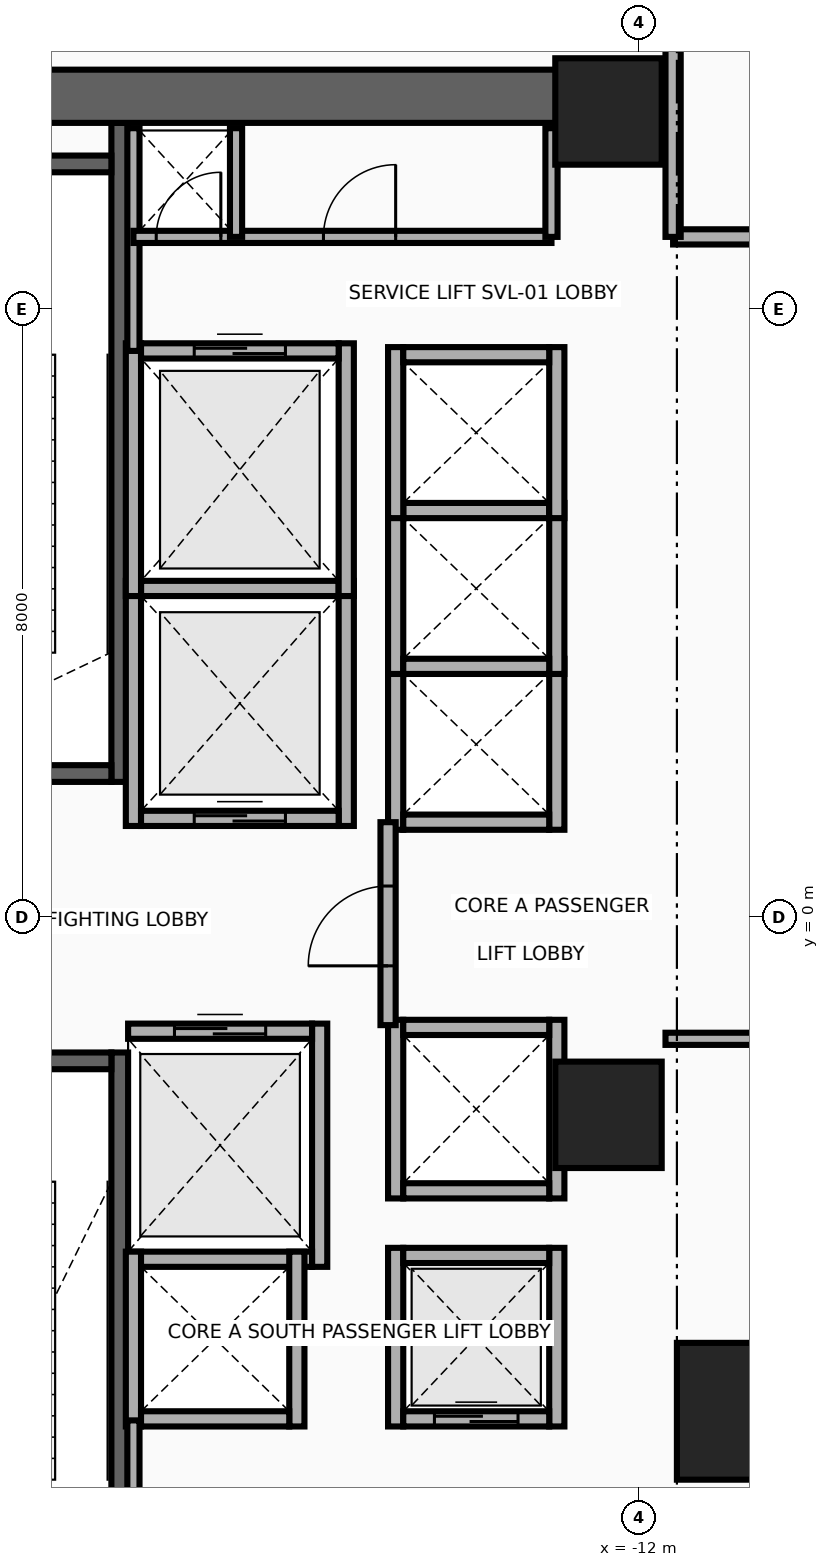
"""IFC4 building model, lengths in metres.
Left out: names, types, materials, properties, quantities, classifications, styles, units other than length and angle.
Written with IfcOpenShell. Run it as: python <this file> out.ifc"""

import sys

from ifc_helpers import new_model, si_unit, direction, frame, frame_2d, origin, origin_2d, place, context, subcontext, project, spatial, rectangle, extrude, source, transform, mapped, element, fill, save


model = new_model("IFC4")
c1 = context("Model", 3, precision=1e-05, world=origin(), true_north=direction((0.0, 1.0)))
c2 = subcontext(c1, "Body", "Model", "MODEL_VIEW")
j1 = project(units=[si_unit("LENGTHUNIT", "METRE"), si_unit("PLANEANGLEUNIT", "RADIAN")], contexts=[c1])
p1 = place(None, origin())
s1 = spatial("IfcSite", under=j1, at=p1, CompositionType="ELEMENT")
p2 = place(p1, origin())
s2 = spatial("IfcBuilding", under=s1, at=p2, CompositionType="ELEMENT")
p3 = place(p2, frame((0.0, 0.0, 20.8)))
s3 = spatial("IfcBuildingStorey", under=s2, at=p3, CompositionType="ELEMENT", Elevation=20.8)
p4 = place(p3, frame((-18.83, 1.78, 0.0), z_axis=(0.0, 0.0, 1.0), x_axis=(0.0, 1.0, 0.0)))
e1 = element("IfcWall", 1, at=p4, inside=s3, PredefinedType="SHEAR", context=c2, shape_type="SweptSolid", body=[
    extrude(rectangle(XDim=8.67, YDim=0.22, at=frame_2d((4.335, 0.0))), origin(), (0.0, 0.0, 1.0), 4.96),
])
p5 = place(p3, frame((-22.05, 1.89, 0.0), z_axis=(0.0, 0.0, 1.0), x_axis=(1.0, 0.0, 0.0)))
e2 = element("IfcWall", 2, at=p5, inside=s3, PredefinedType="SHEAR", context=c2, shape_type="SweptSolid", body=[
    extrude(rectangle(XDim=3.11, YDim=0.22, at=frame_2d((1.555, 0.0))), origin(), (0.0, 0.0, 1.0), 4.96),
])
p6 = place(p5, frame((1.0, 0.0, 0.0)))
e3 = element("IfcOpeningElement", 3, at=p6, cuts=e2, PredefinedType="OPENING", context=c2, shape_type="SweptSolid", body=[
    extrude(rectangle(XDim=1.1, YDim=2.15, at=frame_2d((0.55, 1.075))), frame((0.0, 0.125, 0.0), z_axis=(0.0, -1.0, 0.0), x_axis=(1.0, 0.0, 0.0)), (0.0, 0.0, 1.0), 0.25),
])
p7 = place(p3, frame((-22.05, 9.91, 0.0), z_axis=(0.0, 0.0, 1.0), x_axis=(1.0, 0.0, 0.0)))
e4 = element("IfcWall", 4, at=p7, inside=s3, PredefinedType="SHEAR", context=c2, shape_type="SweptSolid", body=[
    extrude(rectangle(XDim=3.11, YDim=0.22, at=frame_2d((1.555, 0.0))), origin(), (0.0, 0.0, 1.0), 4.96),
])
p8 = place(p3, frame((-18.83, -10.45, 0.0), z_axis=(0.0, 0.0, 1.0), x_axis=(0.0, 1.0, 0.0)))
e5 = element("IfcWall", 5, at=p8, inside=s3, PredefinedType="SHEAR", context=c2, shape_type="SweptSolid", body=[
    extrude(rectangle(XDim=8.67, YDim=0.22, at=frame_2d((4.335, 0.0))), origin(), (0.0, 0.0, 1.0), 4.96),
])
p9 = place(p3, frame((-22.05, -1.89, 0.0), z_axis=(0.0, 0.0, 1.0), x_axis=(1.0, 0.0, 0.0)))
e6 = element("IfcWall", 6, at=p9, inside=s3, PredefinedType="SHEAR", context=c2, shape_type="SweptSolid", body=[
    extrude(rectangle(XDim=3.11, YDim=0.22, at=frame_2d((1.555, 0.0))), origin(), (0.0, 0.0, 1.0), 4.96),
])
p10 = place(p9, frame((1.0, 0.0, 0.0)))
e7 = element("IfcOpeningElement", 7, at=p10, cuts=e6, PredefinedType="OPENING", context=c2, shape_type="SweptSolid", body=[
    extrude(rectangle(XDim=1.1, YDim=2.15, at=frame_2d((0.55, 1.075))), frame((0.0, 0.125, 0.0), z_axis=(0.0, -1.0, 0.0), x_axis=(1.0, 0.0, 0.0)), (0.0, 0.0, 1.0), 0.25),
])
p11 = place(p3, frame((-22.65, 10.8, 0.0), z_axis=(0.0, 0.0, 1.0), x_axis=(1.0, 0.0, 0.0)))
e8 = element("IfcWall", 8, at=p11, inside=s3, PredefinedType="SHEAR", context=c2, shape_type="SweptSolid", body=[
    extrude(rectangle(XDim=10.25, YDim=0.7, at=frame_2d((5.125, 0.0))), origin(), (0.0, 0.0, 1.0), 4.96),
])
m1 = source(origin(), c2, "Body", "SweptSolid", [
    extrude(rectangle(XDim=1.4, YDim=1.4, at=origin_2d()), origin(), (0.0, 0.0, 1.0), 5.2),
])
for number, where, z_axis, x_axis in (
    (9, (-12.4, -2.6, 0.0), (0.0, 0.0, 1.0), (1.0, 0.0, 0.0)),
    (10, (-12.4, 10.6, 0.0), (0.0, 0.0, 1.0), (1.0, 0.0, 0.0)),
):
    element("IfcColumn", number, at=place(p3, frame(where, z_axis=z_axis, x_axis=x_axis)), inside=s3, PredefinedType="COLUMN", context=c2, shape_type="MappedRepresentation", body=[
        mapped(m1, transform((0.0, 0.0, 0.0), x_axis=(1.0, 0.0, 0.0), y_axis=(0.0, 1.0, 0.0), z_axis=(0.0, 0.0, 1.0), scale=1.0)),
    ])
m2 = source(origin(), c2, "Body", "SweptSolid", [
    extrude(rectangle(XDim=1.8, YDim=1.8, at=origin_2d()), origin(), (0.0, 0.0, 1.0), 5.2),
])
p12 = place(p3, frame((-10.6, -6.5, 0.0), z_axis=(0.0, 0.0, 1.0), x_axis=(1.0, 0.0, 0.0)))
e11 = element("IfcColumn", 11, at=p12, inside=s3, PredefinedType="COLUMN", context=c2, shape_type="MappedRepresentation", body=[
    mapped(m2, transform((0.0, 0.0, 0.0), x_axis=(1.0, 0.0, 0.0), y_axis=(0.0, 1.0, 0.0), z_axis=(0.0, 0.0, 1.0), scale=1.0)),
])
for number, where, z_axis, x_axis in (
    (12, (-18.65, 1.2, 0.0), (0.0, 0.0, 1.0), (0.0, 1.0, 0.0)),
    (13, (-15.85, 1.2, 0.0), (0.0, 0.0, 1.0), (0.0, 1.0, 0.0)),
):
    element("IfcWall", number, at=place(p3, frame(where, z_axis=z_axis, x_axis=x_axis)), inside=s3, PredefinedType="MOVABLE", context=c2, shape_type="SweptSolid", body=[
        extrude(rectangle(XDim=3.225, YDim=0.2, at=frame_2d((1.613, 0.0))), origin(), (0.0, 0.0, 1.0), 4.96),
    ])
p13 = place(p3, frame((-18.55, 1.3, 0.0), z_axis=(0.0, 0.0, 1.0), x_axis=(1.0, 0.0, 0.0)))
e14 = element("IfcWall", 14, at=p13, inside=s3, PredefinedType="MOVABLE", context=c2, shape_type="SweptSolid", body=[
    extrude(rectangle(XDim=2.6, YDim=0.2, at=frame_2d((1.3, 0.0))), origin(), (0.0, 0.0, 1.0), 4.96),
])
p14 = place(p13, frame((0.7, 0.0, 0.0)))
e15 = element("IfcOpeningElement", 15, at=p14, cuts=e14, PredefinedType="OPENING", context=c2, shape_type="SweptSolid", body=[
    extrude(rectangle(XDim=1.2, YDim=2.1, at=frame_2d((0.6, 1.05))), frame((0.0, 0.115, 0.0), z_axis=(0.0, -1.0, 0.0), x_axis=(1.0, 0.0, 0.0)), (0.0, 0.0, 1.0), 0.23),
])
p15 = place(p3, frame((-18.55, 4.325, 0.0), z_axis=(0.0, 0.0, 1.0), x_axis=(1.0, 0.0, 0.0)))
e16 = element("IfcWall", 16, at=p15, inside=s3, PredefinedType="MOVABLE", context=c2, shape_type="SweptSolid", body=[
    extrude(rectangle(XDim=2.6, YDim=0.2, at=frame_2d((1.3, 0.0))), origin(), (0.0, 0.0, 1.0), 4.96),
])
p16 = place(p3, frame((-16.2, -4.6, 0.0), z_axis=(0.0, 0.0, 1.0), x_axis=(0.0, 1.0, 0.0)))
e17 = element("IfcWall", 17, at=p16, inside=s3, PredefinedType="MOVABLE", context=c2, shape_type="SweptSolid", body=[
    extrude(rectangle(XDim=3.2, YDim=0.2, at=frame_2d((1.6, 0.0))), origin(), (0.0, 0.0, 1.0), 4.96),
])
p17 = place(p3, frame((-18.72, -4.5, 0.0), z_axis=(0.0, 0.0, 1.0), x_axis=(1.0, 0.0, 0.0)))
e18 = element("IfcWall", 18, at=p17, inside=s3, PredefinedType="MOVABLE", context=c2, shape_type="SweptSolid", body=[
    extrude(rectangle(XDim=2.42, YDim=0.2, at=frame_2d((1.21, 0.0))), origin(), (0.0, 0.0, 1.0), 4.96),
])
p18 = place(p3, frame((-18.72, -1.5, 0.0), z_axis=(0.0, 0.0, 1.0), x_axis=(1.0, 0.0, 0.0)))
e19 = element("IfcWall", 19, at=p18, inside=s3, PredefinedType="MOVABLE", context=c2, shape_type="SweptSolid", body=[
    extrude(rectangle(XDim=2.42, YDim=0.2, at=frame_2d((1.21, 0.0))), origin(), (0.0, 0.0, 1.0), 4.96),
])
p19 = place(p18, frame((0.61, 0.0, 0.0)))
e20 = element("IfcOpeningElement", 20, at=p19, cuts=e19, PredefinedType="OPENING", context=c2, shape_type="SweptSolid", body=[
    extrude(rectangle(XDim=1.2, YDim=2.1, at=frame_2d((0.6, 1.05))), frame((0.0, 0.115, 0.0), z_axis=(0.0, -1.0, 0.0), x_axis=(1.0, 0.0, 0.0)), (0.0, 0.0, 1.0), 0.23),
])
for number, where, z_axis, x_axis in (
    (21, (-18.65, 4.225, 0.0), (0.0, 0.0, 1.0), (0.0, 1.0, 0.0)),
    (22, (-15.85, 4.225, 0.0), (0.0, 0.0, 1.0), (0.0, 1.0, 0.0)),
):
    element("IfcWall", number, at=place(p3, frame(where, z_axis=z_axis, x_axis=x_axis)), inside=s3, PredefinedType="MOVABLE", context=c2, shape_type="SweptSolid", body=[
        extrude(rectangle(XDim=3.325, YDim=0.2, at=frame_2d((1.663, 0.0))), origin(), (0.0, 0.0, 1.0), 4.96),
    ])
p20 = place(p3, frame((-18.55, 7.45, 0.0), z_axis=(0.0, 0.0, 1.0), x_axis=(1.0, 0.0, 0.0)))
e23 = element("IfcWall", 23, at=p20, inside=s3, PredefinedType="MOVABLE", context=c2, shape_type="SweptSolid", body=[
    extrude(rectangle(XDim=2.6, YDim=0.2, at=frame_2d((1.3, 0.0))), origin(), (0.0, 0.0, 1.0), 4.96),
])
p21 = place(p20, frame((0.7, 0.0, 0.0)))
e24 = element("IfcOpeningElement", 24, at=p21, cuts=e23, PredefinedType="OPENING", context=c2, shape_type="SweptSolid", body=[
    extrude(rectangle(XDim=1.2, YDim=2.1, at=frame_2d((0.6, 1.05))), frame((0.0, 0.115, 0.0), z_axis=(0.0, -1.0, 0.0), x_axis=(1.0, 0.0, 0.0)), (0.0, 0.0, 1.0), 0.23),
])
for number, where, z_axis, x_axis in (
    (25, (-15.2, -6.7, 0.0), (0.0, 0.0, 1.0), (0.0, 1.0, 0.0)),
    (26, (-13.08, -6.7, 0.0), (0.0, 0.0, 1.0), (0.0, 1.0, 0.0)),
):
    element("IfcWall", number, at=place(p3, frame(where, z_axis=z_axis, x_axis=x_axis)), inside=s3, PredefinedType="MOVABLE", context=c2, shape_type="SweptSolid", body=[
        extrude(rectangle(XDim=2.35, YDim=0.2, at=frame_2d((1.175, 0.0))), origin(), (0.0, 0.0, 1.0), 4.96),
    ])
p22 = place(p3, frame((-15.1, -6.6, 0.0), z_axis=(0.0, 0.0, 1.0), x_axis=(1.0, 0.0, 0.0)))
e27 = element("IfcWall", 27, at=p22, inside=s3, PredefinedType="MOVABLE", context=c2, shape_type="SweptSolid", body=[
    extrude(rectangle(XDim=1.92, YDim=0.2, at=frame_2d((0.96, 0.0))), origin(), (0.0, 0.0, 1.0), 4.96),
])
p23 = place(p22, frame((0.41, 0.0, 0.0)))
e28 = element("IfcOpeningElement", 28, at=p23, cuts=e27, PredefinedType="OPENING", context=c2, shape_type="SweptSolid", body=[
    extrude(rectangle(XDim=1.1, YDim=2.1, at=frame_2d((0.55, 1.05))), frame((0.0, 0.115, 0.0), z_axis=(0.0, -1.0, 0.0), x_axis=(1.0, 0.0, 0.0)), (0.0, 0.0, 1.0), 0.23),
])
p24 = place(p3, frame((-15.1, -4.45, 0.0), z_axis=(0.0, 0.0, 1.0), x_axis=(1.0, 0.0, 0.0)))
e29 = element("IfcWall", 29, at=p24, inside=s3, PredefinedType="MOVABLE", context=c2, shape_type="SweptSolid", body=[
    extrude(rectangle(XDim=1.92, YDim=0.2, at=frame_2d((0.96, 0.0))), origin(), (0.0, 0.0, 1.0), 4.96),
])
for number, where, z_axis, x_axis in (
    (30, (-15.2, 1.15, 0.0), (0.0, 0.0, 1.0), (0.0, 1.0, 0.0)),
    (31, (-13.08, 1.15, 0.0), (0.0, 0.0, 1.0), (0.0, 1.0, 0.0)),
):
    element("IfcWall", number, at=place(p3, frame(where, z_axis=z_axis, x_axis=x_axis)), inside=s3, PredefinedType="MOVABLE", context=c2, shape_type="SweptSolid", body=[
        extrude(rectangle(XDim=2.25, YDim=0.2, at=frame_2d((1.125, 0.0))), origin(), (0.0, 0.0, 1.0), 4.96),
    ])
p25 = place(p3, frame((-15.1, 1.25, 0.0), z_axis=(0.0, 0.0, 1.0), x_axis=(1.0, 0.0, 0.0)))
e32 = element("IfcWall", 32, at=p25, inside=s3, PredefinedType="MOVABLE", context=c2, shape_type="SweptSolid", body=[
    extrude(rectangle(XDim=1.92, YDim=0.2, at=frame_2d((0.96, 0.0))), origin(), (0.0, 0.0, 1.0), 4.96),
])
for number, where, z_axis, x_axis in (
    (33, (-15.2, 3.2, 0.0), (0.0, 0.0, 1.0), (0.0, 1.0, 0.0)),
    (34, (-13.08, 3.2, 0.0), (0.0, 0.0, 1.0), (0.0, 1.0, 0.0)),
):
    element("IfcWall", number, at=place(p3, frame(where, z_axis=z_axis, x_axis=x_axis)), inside=s3, PredefinedType="MOVABLE", context=c2, shape_type="SweptSolid", body=[
        extrude(rectangle(XDim=2.25, YDim=0.2, at=frame_2d((1.125, 0.0))), origin(), (0.0, 0.0, 1.0), 4.96),
    ])
for number, where, z_axis, x_axis in (
    (35, (-15.1, 3.3, 0.0), (0.0, 0.0, 1.0), (1.0, 0.0, 0.0)),
    (36, (-15.1, 5.35, 0.0), (0.0, 0.0, 1.0), (1.0, 0.0, 0.0)),
):
    element("IfcWall", number, at=place(p3, frame(where, z_axis=z_axis, x_axis=x_axis)), inside=s3, PredefinedType="MOVABLE", context=c2, shape_type="SweptSolid", body=[
        extrude(rectangle(XDim=1.92, YDim=0.2, at=frame_2d((0.96, 0.0))), origin(), (0.0, 0.0, 1.0), 4.96),
    ])
for number, where, z_axis, x_axis in (
    (37, (-15.2, 5.25, 0.0), (0.0, 0.0, 1.0), (0.0, 1.0, 0.0)),
    (38, (-13.08, 5.25, 0.0), (0.0, 0.0, 1.0), (0.0, 1.0, 0.0)),
):
    element("IfcWall", number, at=place(p3, frame(where, z_axis=z_axis, x_axis=x_axis)), inside=s3, PredefinedType="MOVABLE", context=c2, shape_type="SweptSolid", body=[
        extrude(rectangle(XDim=2.25, YDim=0.2, at=frame_2d((1.125, 0.0))), origin(), (0.0, 0.0, 1.0), 4.96),
    ])
p26 = place(p3, frame((-15.1, 7.4, 0.0), z_axis=(0.0, 0.0, 1.0), x_axis=(1.0, 0.0, 0.0)))
e39 = element("IfcWall", 39, at=p26, inside=s3, PredefinedType="MOVABLE", context=c2, shape_type="SweptSolid", body=[
    extrude(rectangle(XDim=1.92, YDim=0.2, at=frame_2d((0.96, 0.0))), origin(), (0.0, 0.0, 1.0), 4.96),
])
for number, where, z_axis, x_axis in (
    (40, (-18.65, -6.7, 0.0), (0.0, 0.0, 1.0), (0.0, 1.0, 0.0)),
    (41, (-16.5, -6.7, 0.0), (0.0, 0.0, 1.0), (0.0, 1.0, 0.0)),
):
    element("IfcWall", number, at=place(p3, frame(where, z_axis=z_axis, x_axis=x_axis)), inside=s3, PredefinedType="MOVABLE", context=c2, shape_type="SweptSolid", body=[
        extrude(rectangle(XDim=2.3, YDim=0.2, at=frame_2d((1.15, 0.0))), origin(), (0.0, 0.0, 1.0), 4.96),
    ])
p27 = place(p3, frame((-18.55, -6.6, 0.0), z_axis=(0.0, 0.0, 1.0), x_axis=(1.0, 0.0, 0.0)))
e42 = element("IfcWall", 42, at=p27, inside=s3, PredefinedType="MOVABLE", context=c2, shape_type="SweptSolid", body=[
    extrude(rectangle(XDim=1.95, YDim=0.2, at=frame_2d((0.975, 0.0))), origin(), (0.0, 0.0, 1.0), 4.96),
])
for number, where, z_axis, x_axis in (
    (43, (-15.2, -3.7, 0.0), (0.0, 0.0, 1.0), (0.0, 1.0, 0.0)),
    (44, (-13.08, -3.7, 0.0), (0.0, 0.0, 1.0), (0.0, 1.0, 0.0)),
):
    element("IfcWall", number, at=place(p3, frame(where, z_axis=z_axis, x_axis=x_axis)), inside=s3, PredefinedType="MOVABLE", context=c2, shape_type="SweptSolid", body=[
        extrude(rectangle(XDim=2.35, YDim=0.2, at=frame_2d((1.175, 0.0))), origin(), (0.0, 0.0, 1.0), 4.96),
    ])
for number, where, z_axis, x_axis in (
    (45, (-15.1, -3.6, 0.0), (0.0, 0.0, 1.0), (1.0, 0.0, 0.0)),
    (46, (-15.1, -1.45, 0.0), (0.0, 0.0, 1.0), (1.0, 0.0, 0.0)),
):
    element("IfcWall", number, at=place(p3, frame(where, z_axis=z_axis, x_axis=x_axis)), inside=s3, PredefinedType="MOVABLE", context=c2, shape_type="SweptSolid", body=[
        extrude(rectangle(XDim=1.92, YDim=0.2, at=frame_2d((0.96, 0.0))), origin(), (0.0, 0.0, 1.0), 4.96),
    ])
p28 = place(p3, frame((-15.3, -1.42, 0.0), z_axis=(0.0, 0.0, 1.0), x_axis=(0.0, 1.0, 0.0)))
e47 = element("IfcWall", 47, at=p28, inside=s3, PredefinedType="PARTITIONING", context=c2, shape_type="SweptSolid", body=[
    extrude(rectangle(XDim=2.67, YDim=0.2, at=frame_2d((1.335, 0.0))), origin(), (0.0, 0.0, 1.0), 4.96),
])
p29 = place(p28, frame((0.78, 0.0, 0.0)))
e48 = element("IfcOpeningElement", 48, at=p29, cuts=e47, PredefinedType="OPENING", context=c2, shape_type="SweptSolid", body=[
    extrude(rectangle(XDim=1.05, YDim=2.15, at=frame_2d((0.525, 1.075))), frame((0.0, 0.115, 0.0), z_axis=(0.0, -1.0, 0.0), x_axis=(1.0, 0.0, 0.0)), (0.0, 0.0, 1.0), 0.23),
])
p30 = place(p3, frame((-18.65, 7.45, 0.0), z_axis=(0.0, 0.0, 1.0), x_axis=(0.0, 1.0, 0.0)))
e49 = element("IfcWall", 49, at=p30, inside=s3, PredefinedType="PARTITIONING", context=c2, shape_type="SweptSolid", body=[
    extrude(rectangle(XDim=2.93, YDim=0.16, at=frame_2d((1.465, 0.0))), origin(), (0.0, 0.0, 1.0), 3.745),
])
p31 = place(p3, frame((-18.65, -8.18, 0.0), z_axis=(0.0, 0.0, 1.0), x_axis=(0.0, 1.0, 0.0)))
e50 = element("IfcWall", 50, at=p31, inside=s3, PredefinedType="PARTITIONING", context=c2, shape_type="SweptSolid", body=[
    extrude(rectangle(XDim=1.56, YDim=0.16, at=frame_2d((0.78, 0.0))), origin(), (0.0, 0.0, 1.0), 4.96),
])
p32 = place(p3, frame((-18.65, 8.95, 0.0), z_axis=(0.0, 0.0, 1.0), x_axis=(1.0, 0.0, 0.0)))
e51 = element("IfcWall", 51, at=p32, inside=s3, PredefinedType="PARTITIONING", context=c2, shape_type="SweptSolid", body=[
    extrude(rectangle(XDim=5.5, YDim=0.16, at=frame_2d((2.75, 0.0))), origin(), (0.0, 0.0, 1.0), 4.96),
])
p33 = place(p32, frame((0.3, 0.0, 0.0)))
e52 = element("IfcOpeningElement", 52, at=p33, cuts=e51, PredefinedType="OPENING", context=c2, shape_type="SweptSolid", body=[
    extrude(rectangle(XDim=0.85, YDim=2.05, at=frame_2d((0.425, 1.025))), frame((0.0, 0.095, 0.0), z_axis=(0.0, -1.0, 0.0), x_axis=(1.0, 0.0, 0.0)), (0.0, 0.0, 1.0), 0.19),
])
p34 = place(p32, frame((2.5, 0.0, 0.0)))
e53 = element("IfcOpeningElement", 53, at=p34, cuts=e51, PredefinedType="OPENING", context=c2, shape_type="SweptSolid", body=[
    extrude(rectangle(XDim=0.95, YDim=2.15, at=frame_2d((0.475, 1.075))), frame((0.0, 0.095, 0.0), z_axis=(0.0, -1.0, 0.0), x_axis=(1.0, 0.0, 0.0)), (0.0, 0.0, 1.0), 0.19),
])
for number, where, z_axis, x_axis in (
    (54, (-13.15, 8.95, 0.0), (0.0, 0.0, 1.0), (0.0, 1.0, 0.0)),
    (55, (-17.3, 8.95, 0.0), (0.0, 0.0, 1.0), (0.0, 1.0, 0.0)),
):
    element("IfcWall", number, at=place(p3, frame(where, z_axis=z_axis, x_axis=x_axis)), inside=s3, PredefinedType="PARTITIONING", context=c2, shape_type="SweptSolid", body=[
        extrude(rectangle(XDim=1.43, YDim=0.16, at=frame_2d((0.715, 0.0))), origin(), (0.0, 0.0, 1.0), 3.745),
    ])
p35 = place(p3, frame((-11.65, -1.6, 0.0), z_axis=(0.0, 0.0, 1.0), x_axis=(1.0, 0.0, 0.0)))
e56 = element("IfcWall", 56, at=p35, inside=s3, PredefinedType="PARTITIONING", context=c2, shape_type="SweptSolid", body=[
    extrude(rectangle(XDim=1.85, YDim=0.16, at=frame_2d((0.925, 0.0))), origin(), (0.0, 0.0, 1.0), 4.96),
])
p36 = place(p3, frame((-11.55, 8.95, 0.0), z_axis=(0.0, 0.0, 1.0), x_axis=(1.0, 0.0, 0.0)))
e57 = element("IfcWall", 57, at=p36, inside=s3, PredefinedType="PARTITIONING", context=c2, shape_type="SweptSolid", body=[
    extrude(rectangle(XDim=27.4, YDim=0.2, at=frame_2d((13.7, 0.0))), origin(), (0.0, 0.0, 1.0), 3.745),
])
p37 = place(p3, frame((-11.55, 8.95, 0.0), z_axis=(0.0, 0.0, 1.0), x_axis=(0.0, 1.0, 0.0)))
e58 = element("IfcWall", 58, at=p37, inside=s3, PredefinedType="PARTITIONING", context=c2, shape_type="SweptSolid", body=[
    extrude(rectangle(XDim=6.7, YDim=0.2, at=frame_2d((3.35, 0.0))), origin(), (0.0, 0.0, 1.0), 3.745),
])
p38 = place(p14, origin())
e59 = element("IfcDoor", 59, at=p38, inside=s3, OperationType="DOUBLE_DOOR_SLIDING", PredefinedType="DOOR", context=c2, shape_type="SweptSolid", body=[
    extrude(rectangle(XDim=1.2, YDim=2.1, at=frame_2d((0.6, 1.05))), frame((0.0, 0.025, 0.0), z_axis=(0.0, -1.0, 0.0), x_axis=(1.0, 0.0, 0.0)), (0.0, 0.0, 1.0), 0.05),
])
fill(e15, e59)
p39 = place(p19, origin())
e60 = element("IfcDoor", 60, at=p39, inside=s3, OperationType="DOUBLE_DOOR_SLIDING", PredefinedType="DOOR", context=c2, shape_type="SweptSolid", body=[
    extrude(rectangle(XDim=1.2, YDim=2.1, at=frame_2d((0.6, 1.05))), frame((0.0, 0.025, 0.0), z_axis=(0.0, -1.0, 0.0), x_axis=(1.0, 0.0, 0.0)), (0.0, 0.0, 1.0), 0.05),
])
fill(e20, e60)
p40 = place(p21, origin())
e61 = element("IfcDoor", 61, at=p40, inside=s3, OperationType="DOUBLE_DOOR_SLIDING", PredefinedType="DOOR", context=c2, shape_type="SweptSolid", body=[
    extrude(rectangle(XDim=1.2, YDim=2.1, at=frame_2d((0.6, 1.05))), frame((0.0, 0.025, 0.0), z_axis=(0.0, -1.0, 0.0), x_axis=(1.0, 0.0, 0.0)), (0.0, 0.0, 1.0), 0.05),
])
fill(e24, e61)
p41 = place(p23, origin())
e62 = element("IfcDoor", 62, at=p41, inside=s3, OperationType="DOUBLE_DOOR_SLIDING", PredefinedType="DOOR", context=c2, shape_type="SweptSolid", body=[
    extrude(rectangle(XDim=1.1, YDim=2.1, at=frame_2d((0.55, 1.05))), frame((0.0, 0.025, 0.0), z_axis=(0.0, -1.0, 0.0), x_axis=(1.0, 0.0, 0.0)), (0.0, 0.0, 1.0), 0.05),
])
fill(e28, e62)
p42 = place(p29, origin())
e63 = element("IfcDoor", 63, at=p42, inside=s3, OperationType="SINGLE_SWING_RIGHT", PredefinedType="DOOR", context=c2, shape_type="SweptSolid", body=[
    extrude(rectangle(XDim=1.05, YDim=2.15, at=frame_2d((0.525, 1.075))), frame((0.0, 0.025, 0.0), z_axis=(0.0, -1.0, 0.0), x_axis=(1.0, 0.0, 0.0)), (0.0, 0.0, 1.0), 0.05),
])
fill(e48, e63)
p43 = place(p33, origin())
e64 = element("IfcDoor", 64, at=p43, inside=s3, OperationType="SINGLE_SWING_LEFT", PredefinedType="DOOR", context=c2, shape_type="SweptSolid", body=[
    extrude(rectangle(XDim=0.85, YDim=2.05, at=frame_2d((0.425, 1.025))), frame((0.0, 0.025, 0.0), z_axis=(0.0, -1.0, 0.0), x_axis=(1.0, 0.0, 0.0)), (0.0, 0.0, 1.0), 0.05),
])
fill(e52, e64)
p44 = place(p34, origin())
e65 = element("IfcDoor", 65, at=p44, inside=s3, OperationType="SINGLE_SWING_RIGHT", PredefinedType="DOOR", context=c2, shape_type="SweptSolid", body=[
    extrude(rectangle(XDim=0.95, YDim=2.15, at=frame_2d((0.475, 1.075))), frame((0.0, 0.025, 0.0), z_axis=(0.0, -1.0, 0.0), x_axis=(1.0, 0.0, 0.0)), (0.0, 0.0, 1.0), 0.05),
])
fill(e53, e65)
save(model, sys.argv[1])
